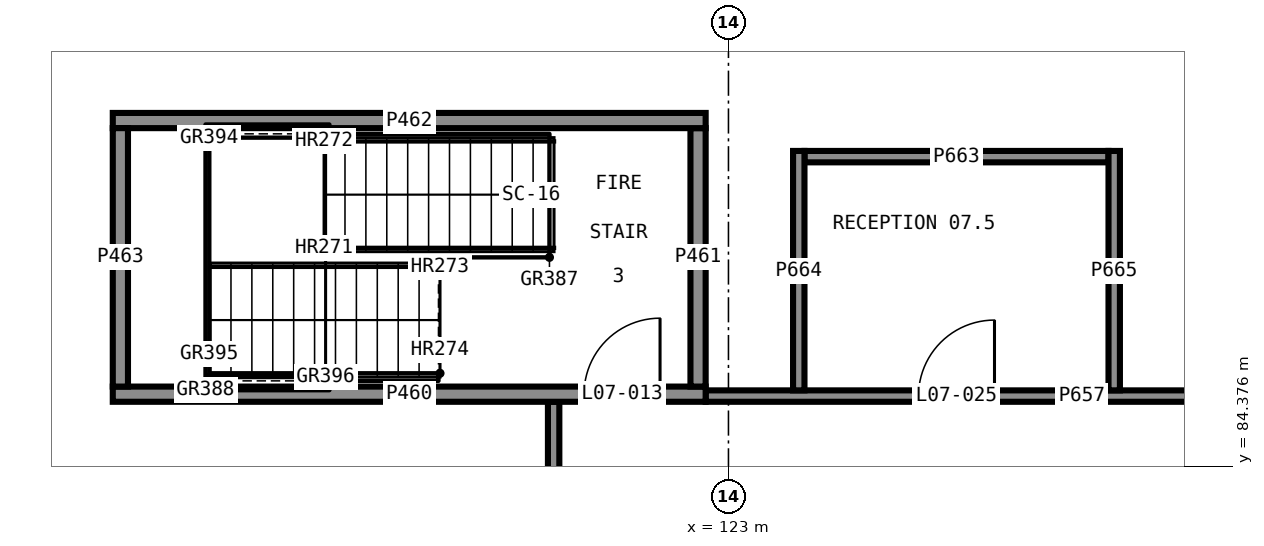
"""IFC4 building model, lengths in metres.
Left out: names, types, materials, properties, quantities, classifications, styles, units other than length and angle.
Written with IfcOpenShell. Run it as: python <this file> out.ifc"""

import sys

from ifc_helpers import new_model, si_unit, direction, frame, frame_2d, origin, place, context, subcontext, project, spatial, rectangle, extrude, element, fill, save


model = new_model("IFC4")
c1 = context("Model", 3, precision=1e-05, world=origin(), true_north=direction((0.0, 1.0)))
c2 = subcontext(c1, "Body", "Model", "MODEL_VIEW")
j1 = project(units=[si_unit("LENGTHUNIT", "METRE"), si_unit("PLANEANGLEUNIT", "RADIAN")], contexts=[c1])
p1 = place(None, origin())
s1 = spatial("IfcSite", under=j1, at=p1, CompositionType="ELEMENT")
p2 = place(p1, origin())
s2 = spatial("IfcBuilding", under=s1, at=p2, CompositionType="ELEMENT")
p3 = place(p2, frame((0.0, 0.0, 29.5)))
s3 = spatial("IfcBuildingStorey", under=s2, at=p3, CompositionType="ELEMENT", Elevation=29.5)
p4 = place(p3, frame((114.9, 85.325, 0.0), z_axis=(0.0, 0.0, 1.0), x_axis=(1.0, 0.0, 0.0)))
e1 = element("IfcWall", 1, at=p4, inside=s3, PredefinedType="SHEAR", context=c2, shape_type="SweptSolid", body=[
    extrude(rectangle(XDim=7.8, YDim=0.2, at=frame_2d((3.9, 0.0))), origin(), (0.0, 0.0, 1.0), 3.75),
])
p5 = place(p4, frame((6.2, 0.0, 0.0)))
e2 = element("IfcOpeningElement", 2, at=p5, cuts=e1, PredefinedType="OPENING", context=c2, shape_type="SweptSolid", body=[
    extrude(rectangle(XDim=1.0, YDim=2.1, at=frame_2d((0.5, 1.05))), frame((0.0, 0.11, 0.0), z_axis=(0.0, -1.0, 0.0), x_axis=(1.0, 0.0, 0.0)), (0.0, 0.0, 1.0), 0.22),
])
p6 = place(p3, frame((122.6, 85.425, 0.0), z_axis=(0.0, 0.0, 1.0), x_axis=(0.0, 1.0, 0.0)))
e3 = element("IfcWall", 3, at=p6, inside=s3, PredefinedType="SHEAR", context=c2, shape_type="SweptSolid", body=[
    extrude(rectangle(XDim=3.4, YDim=0.2, at=frame_2d((1.7, 0.0))), origin(), (0.0, 0.0, 1.0), 3.75),
])
p7 = place(p3, frame((122.7, 88.925, 0.0), z_axis=(0.0, 0.0, 1.0), x_axis=(-1.0, 0.0, 0.0)))
e4 = element("IfcWall", 4, at=p7, inside=s3, PredefinedType="SHEAR", context=c2, shape_type="SweptSolid", body=[
    extrude(rectangle(XDim=7.8, YDim=0.2, at=frame_2d((3.9, 0.0))), origin(), (0.0, 0.0, 1.0), 3.75),
])
p8 = place(p3, frame((115.0, 88.825, 0.0), z_axis=(0.0, 0.0, 1.0), x_axis=(0.0, -1.0, 0.0)))
e5 = element("IfcWall", 5, at=p8, inside=s3, PredefinedType="SHEAR", context=c2, shape_type="SweptSolid", body=[
    extrude(rectangle(XDim=3.4, YDim=0.2, at=frame_2d((1.7, 0.0))), origin(), (0.0, 0.0, 1.0), 3.75),
])
p9 = place(p3, frame((120.7, 62.7, 0.0), z_axis=(0.0, 0.0, 1.0), x_axis=(0.0, 1.0, 0.0)))
e6 = element("IfcWall", 6, at=p9, inside=s3, PredefinedType="PARTITIONING", context=c2, shape_type="SweptSolid", body=[
    extrude(rectangle(XDim=22.525, YDim=0.15, at=frame_2d((11.263, 0.0))), origin(), (0.0, 0.0, 1.0), 3.75),
])
p10 = place(p9, frame((16.435, 0.0, 0.0)))
e7 = element("IfcOpeningElement", 7, at=p10, cuts=e6, PredefinedType="OPENING", context=c2, shape_type="SweptSolid", body=[
    extrude(rectangle(XDim=1.0, YDim=2.1, at=frame_2d((0.5, 1.05))), frame((0.0, 0.085, 0.0), z_axis=(0.0, -1.0, 0.0), x_axis=(1.0, 0.0, 0.0)), (0.0, 0.0, 1.0), 0.17),
])
p11 = place(p3, frame((122.7, 85.3, 0.0), z_axis=(0.0, 0.0, 1.0), x_axis=(1.0, 0.0, 0.0)))
e8 = element("IfcWall", 8, at=p11, inside=s3, PredefinedType="PARTITIONING", context=c2, shape_type="SweptSolid", body=[
    extrude(rectangle(XDim=9.9, YDim=0.15, at=frame_2d((4.95, 0.0))), origin(), (0.0, 0.0, 1.0), 3.75),
])
p12 = place(p11, frame((2.8, 0.0, 0.0)))
e9 = element("IfcOpeningElement", 9, at=p12, cuts=e8, PredefinedType="OPENING", context=c2, shape_type="SweptSolid", body=[
    extrude(rectangle(XDim=1.0, YDim=2.1, at=frame_2d((0.5, 1.05))), frame((0.0, 0.085, 0.0), z_axis=(0.0, -1.0, 0.0), x_axis=(1.0, 0.0, 0.0)), (0.0, 0.0, 1.0), 0.17),
])
p13 = place(p3, frame((124.0, 88.45, 0.0), z_axis=(0.0, 0.0, 1.0), x_axis=(1.0, 0.0, 0.0)))
e10 = element("IfcWall", 10, at=p13, inside=s3, PredefinedType="PARTITIONING", context=c2, shape_type="SweptSolid", body=[
    extrude(rectangle(XDim=4.0, YDim=0.15, at=frame_2d((2.0, 0.0))), origin(), (0.0, 0.0, 1.0), 3.75),
])
for number, where, z_axis, x_axis in (
    (11, (123.925, 85.375, 0.0), (0.0, 0.0, 1.0), (0.0, 1.0, 0.0)),
    (12, (128.075, 85.375, 0.0), (0.0, 0.0, 1.0), (0.0, 1.0, 0.0)),
):
    element("IfcWall", number, at=place(p3, frame(where, z_axis=z_axis, x_axis=x_axis)), inside=s3, PredefinedType="PARTITIONING", context=c2, shape_type="SweptSolid", body=[
        extrude(rectangle(XDim=3.15, YDim=0.15, at=frame_2d((1.575, 0.0))), origin(), (0.0, 0.0, 1.0), 3.75),
    ])
p14 = place(p5, origin())
e13 = element("IfcDoor", 13, at=p14, inside=s3, OperationType="SINGLE_SWING_LEFT", PredefinedType="DOOR", context=c2, shape_type="SweptSolid", body=[
    extrude(rectangle(XDim=1.0, YDim=2.1, at=frame_2d((0.5, 1.05))), frame((0.0, 0.025, 0.0), z_axis=(0.0, -1.0, 0.0), x_axis=(1.0, 0.0, 0.0)), (0.0, 0.0, 1.0), 0.05),
])
fill(e2, e13)
p15 = place(p12, origin())
e14 = element("IfcDoor", 14, at=p15, inside=s3, OperationType="SINGLE_SWING_LEFT", PredefinedType="DOOR", context=c2, shape_type="SweptSolid", body=[
    extrude(rectangle(XDim=1.0, YDim=2.1, at=frame_2d((0.5, 1.05))), frame((0.0, 0.025, 0.0), z_axis=(0.0, -1.0, 0.0), x_axis=(1.0, 0.0, 0.0)), (0.0, 0.0, 1.0), 0.05),
])
fill(e9, e14)
save(model, sys.argv[1])
